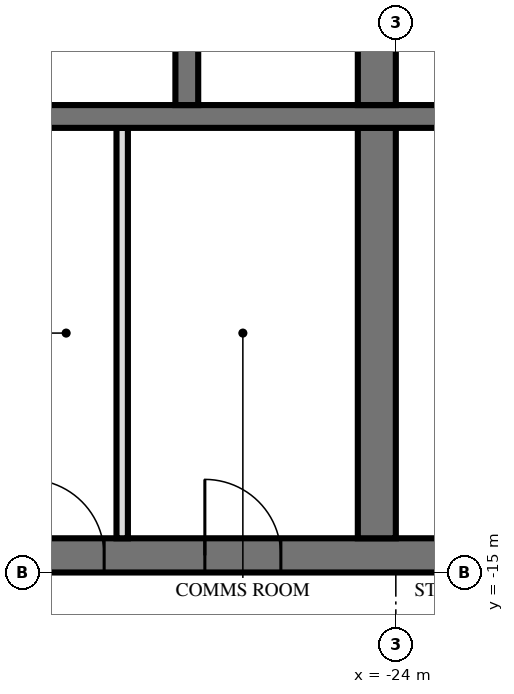
"""IFC4 building model, lengths in metres.
Left out: names, types, materials, properties, quantities, classifications, styles, units other than length and angle.
Written with IfcOpenShell. Run it as: python <this file> out.ifc"""

import sys

from ifc_helpers import new_model, si_unit, direction, frame, frame_2d, origin, place, context, subcontext, project, spatial, rectangle, extrude, element, fill, save


model = new_model("IFC4")
c1 = context("Model", 3, precision=1e-05, world=origin(), true_north=direction((0.0, 1.0)))
c2 = subcontext(c1, "Body", "Model", "MODEL_VIEW")
j1 = project(units=[si_unit("LENGTHUNIT", "METRE"), si_unit("PLANEANGLEUNIT", "RADIAN")], contexts=[c1])
p1 = place(None, origin())
s1 = spatial("IfcSite", under=j1, at=p1, CompositionType="ELEMENT")
p2 = place(p1, origin())
s2 = spatial("IfcBuilding", under=s1, at=p2, CompositionType="ELEMENT")
p3 = place(p2, frame((0.0, 0.0, 34.8)))
s3 = spatial("IfcBuildingStorey", under=s2, at=p3, CompositionType="ELEMENT", Elevation=34.8)
p4 = place(p3, frame((-29.5, -14.775, 0.0), z_axis=(0.0, 0.0, 1.0), x_axis=(1.0, 0.0, 0.0)))
e1 = element("IfcWall", 1, at=p4, inside=s3, PredefinedType="SHEAR", context=c2, shape_type="SweptSolid", body=[
    extrude(rectangle(XDim=19.5, YDim=0.45, at=frame_2d((9.75, 0.0))), origin(), (0.0, 0.0, 1.0), 3.6),
])
p5 = place(p4, frame((11.2, 0.0, 0.0)))
e2 = element("IfcOpeningElement", 2, at=p5, cuts=e1, PredefinedType="OPENING", context=c2, shape_type="SweptSolid", body=[
    extrude(rectangle(XDim=1.2, YDim=2.1, at=frame_2d((0.6, 1.05))), frame((0.0, 0.235, 0.0), z_axis=(0.0, -1.0, 0.0), x_axis=(1.0, 0.0, 0.0)), (0.0, 0.0, 1.0), 0.47),
])
p6 = place(p4, frame((14.25, 0.0, 0.0)))
e3 = element("IfcOpeningElement", 3, at=p6, cuts=e1, PredefinedType="OPENING", context=c2, shape_type="SweptSolid", body=[
    extrude(rectangle(XDim=1.1, YDim=2.1, at=frame_2d((0.55, 1.05))), frame((0.0, 0.235, 0.0), z_axis=(0.0, -1.0, 0.0), x_axis=(1.0, 0.0, 0.0)), (0.0, 0.0, 1.0), 0.47),
])
p7 = place(p4, frame((8.5, 0.0, 0.0)))
e4 = element("IfcOpeningElement", 4, at=p7, cuts=e1, PredefinedType="OPENING", context=c2, shape_type="SweptSolid", body=[
    extrude(rectangle(XDim=0.9, YDim=2.1, at=frame_2d((0.45, 1.05))), frame((0.0, 0.235, 0.0), z_axis=(0.0, -1.0, 0.0), x_axis=(1.0, 0.0, 0.0)), (0.0, 0.0, 1.0), 0.47),
])
p8 = place(p4, frame((6.05, 0.0, 0.0)))
e5 = element("IfcOpeningElement", 5, at=p8, cuts=e1, PredefinedType="OPENING", context=c2, shape_type="SweptSolid", body=[
    extrude(rectangle(XDim=1.0, YDim=2.1, at=frame_2d((0.5, 1.05))), frame((0.0, 0.235, 0.0), z_axis=(0.0, -1.0, 0.0), x_axis=(1.0, 0.0, 0.0)), (0.0, 0.0, 1.0), 0.47),
])
p9 = place(p4, frame((2.988, 0.0, 0.0)))
e6 = element("IfcOpeningElement", 6, at=p9, cuts=e1, PredefinedType="OPENING", context=c2, shape_type="SweptSolid", body=[
    extrude(rectangle(XDim=1.0, YDim=2.1, at=frame_2d((0.5, 1.05))), frame((0.0, 0.235, 0.0), z_axis=(0.0, -1.0, 0.0), x_axis=(1.0, 0.0, 0.0)), (0.0, 0.0, 1.0), 0.47),
])
p10 = place(p4, frame((0.663, 0.0, 0.0)))
e7 = element("IfcOpeningElement", 7, at=p10, cuts=e1, PredefinedType="OPENING", context=c2, shape_type="SweptSolid", body=[
    extrude(rectangle(XDim=1.0, YDim=2.1, at=frame_2d((0.5, 1.05))), frame((0.0, 0.235, 0.0), z_axis=(0.0, -1.0, 0.0), x_axis=(1.0, 0.0, 0.0)), (0.0, 0.0, 1.0), 0.47),
])
p11 = place(p3, frame((-29.05, -9.0, 0.0), z_axis=(0.0, 0.0, 1.0), x_axis=(1.0, 0.0, 0.0)))
e8 = element("IfcWall", 8, at=p11, inside=s3, PredefinedType="SHEAR", context=c2, shape_type="SweptSolid", body=[
    extrude(rectangle(XDim=18.7, YDim=0.3, at=frame_2d((9.35, 0.0))), origin(), (0.0, 0.0, 1.0), 3.6),
])
p12 = place(p11, frame((13.8, 0.0, 0.0)))
e9 = element("IfcOpeningElement", 9, at=p12, cuts=e8, PredefinedType="OPENING", context=c2, shape_type="SweptSolid", body=[
    extrude(rectangle(XDim=1.1, YDim=2.1, at=frame_2d((0.55, 1.05))), frame((0.0, 0.16, 0.0), z_axis=(0.0, -1.0, 0.0), x_axis=(1.0, 0.0, 0.0)), (0.0, 0.0, 1.0), 0.32),
])
p13 = place(p3, frame((-24.25, -8.85, 0.0), z_axis=(0.0, 0.0, 1.0), x_axis=(0.0, 1.0, 0.0)))
e10 = element("IfcWall", 10, at=p13, inside=s3, PredefinedType="SHEAR", context=c2, shape_type="SweptSolid", body=[
    extrude(rectangle(XDim=2.3, YDim=0.5, at=frame_2d((1.15, 0.0))), origin(), (0.0, 0.0, 1.0), 3.6),
])
p14 = place(p3, frame((-24.25, -14.55, 0.0), z_axis=(0.0, 0.0, 1.0), x_axis=(0.0, 1.0, 0.0)))
e11 = element("IfcWall", 11, at=p14, inside=s3, PredefinedType="SHEAR", context=c2, shape_type="SweptSolid", body=[
    extrude(rectangle(XDim=5.4, YDim=0.5, at=frame_2d((2.7, 0.0))), origin(), (0.0, 0.0, 1.0), 3.6),
])
p15 = place(p3, frame((-26.75, -8.85, 0.0), z_axis=(0.0, 0.0, 1.0), x_axis=(0.0, 1.0, 0.0)))
e12 = element("IfcWall", 12, at=p15, inside=s3, PredefinedType="SHEAR", context=c2, shape_type="SweptSolid", body=[
    extrude(rectangle(XDim=2.3, YDim=0.3, at=frame_2d((1.15, 0.0))), origin(), (0.0, 0.0, 1.0), 3.6),
])
p16 = place(p3, frame((-27.6, -14.55, 0.0), z_axis=(0.0, 0.0, 1.0), x_axis=(0.0, 1.0, 0.0)))
e13 = element("IfcWall", 13, at=p16, inside=s3, PredefinedType="PARTITIONING", context=c2, shape_type="SweptSolid", body=[
    extrude(rectangle(XDim=5.4, YDim=0.15, at=frame_2d((2.7, 0.0))), origin(), (0.0, 0.0, 1.0), 3.3),
])
p17 = place(p9, origin())
e14 = element("IfcDoor", 14, at=p17, inside=s3, OperationType="SINGLE_SWING_RIGHT", PredefinedType="DOOR", context=c2, shape_type="SweptSolid", body=[
    extrude(rectangle(XDim=1.0, YDim=2.1, at=frame_2d((0.5, 1.05))), frame((0.0, 0.025, 0.0), z_axis=(0.0, -1.0, 0.0), x_axis=(1.0, 0.0, 0.0)), (0.0, 0.0, 1.0), 0.05),
])
fill(e6, e14)
p18 = place(p10, origin())
e15 = element("IfcDoor", 15, at=p18, inside=s3, OperationType="SINGLE_SWING_RIGHT", PredefinedType="DOOR", context=c2, shape_type="SweptSolid", body=[
    extrude(rectangle(XDim=1.0, YDim=2.1, at=frame_2d((0.5, 1.05))), frame((0.0, 0.025, 0.0), z_axis=(0.0, -1.0, 0.0), x_axis=(1.0, 0.0, 0.0)), (0.0, 0.0, 1.0), 0.05),
])
fill(e7, e15)
save(model, sys.argv[1])
